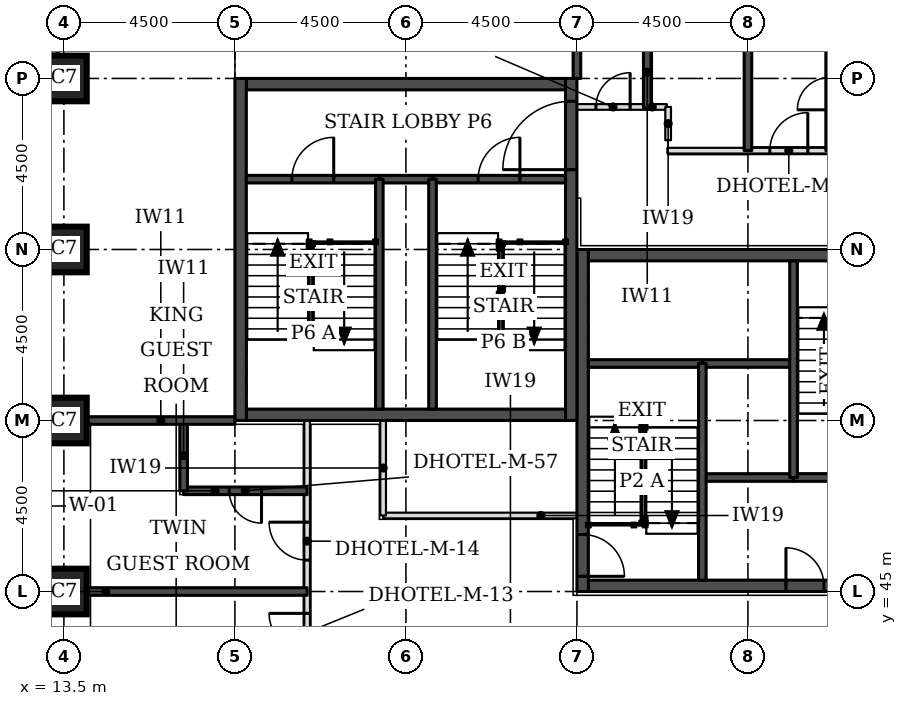
"""IFC4 building model, lengths in metres.
Left out: names, types, materials, properties, quantities, classifications, styles, units other than length and angle.
Written with IfcOpenShell. Run it as: python <this file> out.ifc"""

import sys

from ifc_helpers import new_model, si_unit, direction, frame, frame_2d, origin, origin_2d, place, context, subcontext, project, spatial, rectangle, extrude, element, fill, save


model = new_model("IFC4")
c1 = context("Model", 3, precision=1e-05, world=origin(), true_north=direction((0.0, 1.0)))
c2 = subcontext(c1, "Body", "Model", "MODEL_VIEW")
j1 = project(units=[si_unit("LENGTHUNIT", "METRE"), si_unit("PLANEANGLEUNIT", "RADIAN")], contexts=[c1])
p1 = place(None, origin())
s1 = spatial("IfcSite", under=j1, at=p1, CompositionType="ELEMENT")
p2 = place(p1, origin())
s2 = spatial("IfcBuilding", under=s1, at=p2, CompositionType="ELEMENT")
p3 = place(p2, frame((0.0, 0.0, 23.1)))
s3 = spatial("IfcBuildingStorey", under=s2, at=p3, CompositionType="ELEMENT", Elevation=23.1)
for number, where, z_axis, x_axis in (
    (1, (13.5, 45.0, 0.0), (0.0, 0.0, 1.0), (1.0, 0.0, 0.0)),
    (2, (13.5, 49.5, 0.0), (0.0, 0.0, 1.0), (1.0, 0.0, 0.0)),
    (3, (13.5, 54.0, 0.0), (0.0, 0.0, 1.0), (1.0, 0.0, 0.0)),
    (4, (13.5, 58.5, 0.0), (0.0, 0.0, 1.0), (1.0, 0.0, 0.0)),
):
    element("IfcColumn", number, at=place(p3, frame(where, z_axis=z_axis, x_axis=x_axis)), inside=s3, PredefinedType="COLUMN", context=c2, shape_type="SweptSolid", body=[
        extrude(rectangle(XDim=1.2, YDim=1.2, at=origin_2d()), origin(), (0.0, 0.0, 1.0), 3.3),
    ])
p4 = place(p3, frame((27.3, 45.15, 0.0), z_axis=(0.0, 0.0, 1.0), x_axis=(1.0, 0.0, 0.0)))
e5 = element("IfcWall", 5, at=p4, inside=s3, PredefinedType="SHEAR", context=c2, shape_type="SweptSolid", body=[
    extrude(rectangle(XDim=8.4, YDim=0.3, at=frame_2d((4.2, 0.0))), origin(), (0.0, 0.0, 1.0), 3.3),
])
p5 = place(p4, frame((5.2, 0.0, 0.0)))
e6 = element("IfcOpeningElement", 6, at=p5, cuts=e5, PredefinedType="OPENING", context=c2, shape_type="SweptSolid", body=[
    extrude(rectangle(XDim=1.0, YDim=2.1, at=frame_2d((0.5, 1.05))), frame((0.0, 0.16, 0.0), z_axis=(0.0, -1.0, 0.0), x_axis=(1.0, 0.0, 0.0)), (0.0, 0.0, 1.0), 0.32),
])
p6 = place(p3, frame((27.3, 53.85, 0.0), z_axis=(0.0, 0.0, 1.0), x_axis=(1.0, 0.0, 0.0)))
e7 = element("IfcWall", 7, at=p6, inside=s3, PredefinedType="SHEAR", context=c2, shape_type="SweptSolid", body=[
    extrude(rectangle(XDim=8.4, YDim=0.3, at=frame_2d((4.2, 0.0))), origin(), (0.0, 0.0, 1.0), 3.3),
])
p7 = place(p6, frame((6.4, 0.0, 0.0)))
e8 = element("IfcOpeningElement", 8, at=p7, cuts=e7, PredefinedType="OPENING", context=c2, shape_type="SweptSolid", body=[
    extrude(rectangle(XDim=1.1, YDim=2.1, at=frame_2d((0.55, 1.05))), frame((0.0, 0.16, 0.0), z_axis=(0.0, -1.0, 0.0), x_axis=(1.0, 0.0, 0.0)), (0.0, 0.0, 1.0), 0.32),
])
p8 = place(p3, frame((27.15, 45.0, 0.0), z_axis=(0.0, 0.0, 1.0), x_axis=(0.0, 1.0, 0.0)))
e9 = element("IfcWall", 9, at=p8, inside=s3, PredefinedType="SHEAR", context=c2, shape_type="SweptSolid", body=[
    extrude(rectangle(XDim=9.0, YDim=0.3, at=frame_2d((4.5, 0.0))), origin(), (0.0, 0.0, 1.0), 3.3),
])
p9 = place(p8, frame((0.4, 0.0, 0.0)))
e10 = element("IfcOpeningElement", 10, at=p9, cuts=e9, PredefinedType="OPENING", context=c2, shape_type="SweptSolid", body=[
    extrude(rectangle(XDim=1.1, YDim=2.1, at=frame_2d((0.55, 1.05))), frame((0.0, 0.16, 0.0), z_axis=(0.0, -1.0, 0.0), x_axis=(1.0, 0.0, 0.0)), (0.0, 0.0, 1.0), 0.32),
])
for number, where, z_axis, x_axis in (
    (11, (18.3, 49.65, 0.0), (0.0, 0.0, 1.0), (1.0, 0.0, 0.0)),
    (12, (18.3, 58.35, 0.0), (0.0, 0.0, 1.0), (1.0, 0.0, 0.0)),
):
    element("IfcWall", number, at=place(p3, frame(where, z_axis=z_axis, x_axis=x_axis)), inside=s3, PredefinedType="SHEAR", context=c2, shape_type="SweptSolid", body=[
        extrude(rectangle(XDim=8.4, YDim=0.3, at=frame_2d((4.2, 0.0))), origin(), (0.0, 0.0, 1.0), 3.3),
    ])
p10 = place(p3, frame((18.15, 49.5, 0.0), z_axis=(0.0, 0.0, 1.0), x_axis=(0.0, 1.0, 0.0)))
e13 = element("IfcWall", 13, at=p10, inside=s3, PredefinedType="SHEAR", context=c2, shape_type="SweptSolid", body=[
    extrude(rectangle(XDim=9.0, YDim=0.3, at=frame_2d((4.5, 0.0))), origin(), (0.0, 0.0, 1.0), 3.3),
])
p11 = place(p3, frame((26.85, 49.5, 0.0), z_axis=(0.0, 0.0, 1.0), x_axis=(0.0, 1.0, 0.0)))
e14 = element("IfcWall", 14, at=p11, inside=s3, PredefinedType="SHEAR", context=c2, shape_type="SweptSolid", body=[
    extrude(rectangle(XDim=9.0, YDim=0.3, at=frame_2d((4.5, 0.0))), origin(), (0.0, 0.0, 1.0), 3.3),
])
p12 = place(p11, frame((6.6, 0.0, 0.0)))
e15 = element("IfcOpeningElement", 15, at=p12, cuts=e14, PredefinedType="OPENING", context=c2, shape_type="SweptSolid", body=[
    extrude(rectangle(XDim=1.8, YDim=2.1, at=frame_2d((0.9, 1.05))), frame((0.0, 0.16, 0.0), z_axis=(0.0, -1.0, 0.0), x_axis=(1.0, 0.0, 0.0)), (0.0, 0.0, 1.0), 0.32),
])
p13 = place(p3, frame((17.73, 63.826, 0.0), z_axis=(0.0, 0.0, 1.0), x_axis=(-0.707106781187, -0.707106781187, 0.0)))
e16 = element("IfcWall", 16, at=p13, inside=s3, PredefinedType="STANDARD", context=c2, shape_type="SweptSolid", body=[
    extrude(rectangle(XDim=7.151, YDim=0.35, at=frame_2d((3.576, 0.0))), origin(), (0.0, 0.0, 1.0), 3.055),
])
p14 = place(p13, frame((1.926, 0.0, 0.8)))
e17 = element("IfcOpeningElement", 17, at=p14, cuts=e16, PredefinedType="OPENING", context=c2, shape_type="SweptSolid", body=[
    extrude(rectangle(XDim=3.3, YDim=1.5, at=frame_2d((1.65, 0.75))), frame((0.0, 0.185, 0.0), z_axis=(0.0, -1.0, 0.0), x_axis=(1.0, 0.0, 0.0)), (0.0, 0.0, 1.0), 0.37),
])
p15 = place(p3, frame((19.9, 24.4, 0.0), z_axis=(0.0, 0.0, 1.0), x_axis=(0.0, 1.0, 0.0)))
e18 = element("IfcWall", 18, at=p15, inside=s3, PredefinedType="PARTITIONING", context=c2, shape_type="SweptSolid", body=[
    extrude(rectangle(XDim=25.1, YDim=0.15, at=frame_2d((12.55, 0.0))), origin(), (0.0, 0.0, 1.0), 3.08),
])
p16 = place(p15, frame((0.447, 0.0, 0.0)))
e19 = element("IfcOpeningElement", 19, at=p16, cuts=e18, PredefinedType="OPENING", context=c2, shape_type="SweptSolid", body=[
    extrude(rectangle(XDim=0.9, YDim=2.1, at=frame_2d((0.45, 1.05))), frame((0.0, 0.085, 0.0), z_axis=(0.0, -1.0, 0.0), x_axis=(1.0, 0.0, 0.0)), (0.0, 0.0, 1.0), 0.17),
])
p17 = place(p15, frame((4.4, 0.0, 0.0)))
e20 = element("IfcOpeningElement", 20, at=p17, cuts=e18, PredefinedType="OPENING", context=c2, shape_type="SweptSolid", body=[
    extrude(rectangle(XDim=0.9, YDim=2.1, at=frame_2d((0.45, 1.05))), frame((0.0, 0.085, 0.0), z_axis=(0.0, -1.0, 0.0), x_axis=(1.0, 0.0, 0.0)), (0.0, 0.0, 1.0), 0.17),
])
p18 = place(p15, frame((10.025, 0.0, 0.0)))
e21 = element("IfcOpeningElement", 21, at=p18, cuts=e18, PredefinedType="OPENING", context=c2, shape_type="SweptSolid", body=[
    extrude(rectangle(XDim=1.0, YDim=2.1, at=frame_2d((0.5, 1.05))), frame((0.0, 0.085, 0.0), z_axis=(0.0, -1.0, 0.0), x_axis=(1.0, 0.0, 0.0)), (0.0, 0.0, 1.0), 0.17),
])
p19 = place(p15, frame((12.425, 0.0, 0.0)))
e22 = element("IfcOpeningElement", 22, at=p19, cuts=e18, PredefinedType="OPENING", context=c2, shape_type="SweptSolid", body=[
    extrude(rectangle(XDim=1.0, YDim=2.1, at=frame_2d((0.5, 1.05))), frame((0.0, 0.085, 0.0), z_axis=(0.0, -1.0, 0.0), x_axis=(1.0, 0.0, 0.0)), (0.0, 0.0, 1.0), 0.17),
])
p20 = place(p15, frame((19.025, 0.0, 0.0)))
e23 = element("IfcOpeningElement", 23, at=p20, cuts=e18, PredefinedType="OPENING", context=c2, shape_type="SweptSolid", body=[
    extrude(rectangle(XDim=1.0, YDim=2.1, at=frame_2d((0.5, 1.05))), frame((0.0, 0.085, 0.0), z_axis=(0.0, -1.0, 0.0), x_axis=(1.0, 0.0, 0.0)), (0.0, 0.0, 1.0), 0.17),
])
p21 = place(p15, frame((21.425, 0.0, 0.0)))
e24 = element("IfcOpeningElement", 24, at=p21, cuts=e18, PredefinedType="OPENING", context=c2, shape_type="SweptSolid", body=[
    extrude(rectangle(XDim=1.0, YDim=2.1, at=frame_2d((0.5, 1.05))), frame((0.0, 0.085, 0.0), z_axis=(0.0, -1.0, 0.0), x_axis=(1.0, 0.0, 0.0)), (0.0, 0.0, 1.0), 0.17),
])
p22 = place(p3, frame((21.9, 47.0, 0.0), z_axis=(0.0, 0.0, 1.0), x_axis=(1.0, 0.0, 0.0)))
e25 = element("IfcWall", 25, at=p22, inside=s3, PredefinedType="PARTITIONING", context=c2, shape_type="SweptSolid", body=[
    extrude(rectangle(XDim=5.1, YDim=0.15, at=frame_2d((2.55, 0.0))), origin(), (0.0, 0.0, 1.0), 3.08),
])
p23 = place(p3, frame((21.9, 47.0, 0.0), z_axis=(0.0, 0.0, 1.0), x_axis=(0.0, 1.0, 0.0)))
e26 = element("IfcWall", 26, at=p23, inside=s3, PredefinedType="PARTITIONING", context=c2, shape_type="SweptSolid", body=[
    extrude(rectangle(XDim=2.5, YDim=0.15, at=frame_2d((1.25, 0.0))), origin(), (0.0, 0.0, 1.0), 3.08),
])
p24 = place(p3, frame((29.38, 56.6, 0.0), z_axis=(0.0, 0.0, 1.0), x_axis=(1.0, 0.0, 0.0)))
e27 = element("IfcWall", 27, at=p24, inside=s3, PredefinedType="PARTITIONING", context=c2, shape_type="SweptSolid", body=[
    extrude(rectangle(XDim=13.62, YDim=0.15, at=frame_2d((6.81, 0.0))), origin(), (0.0, 0.0, 1.0), 3.08),
])
p25 = place(p24, frame((2.695, 0.0, 0.0)))
e28 = element("IfcOpeningElement", 28, at=p25, cuts=e27, PredefinedType="OPENING", context=c2, shape_type="SweptSolid", body=[
    extrude(rectangle(XDim=1.0, YDim=2.1, at=frame_2d((0.5, 1.05))), frame((0.0, 0.085, 0.0), z_axis=(0.0, -1.0, 0.0), x_axis=(1.0, 0.0, 0.0)), (0.0, 0.0, 1.0), 0.17),
])
p26 = place(p24, frame((9.67, 0.0, 0.0)))
e29 = element("IfcOpeningElement", 29, at=p26, cuts=e27, PredefinedType="OPENING", context=c2, shape_type="SweptSolid", body=[
    extrude(rectangle(XDim=0.9, YDim=2.1, at=frame_2d((0.45, 1.05))), frame((0.0, 0.085, 0.0), z_axis=(0.0, -1.0, 0.0), x_axis=(1.0, 0.0, 0.0)), (0.0, 0.0, 1.0), 0.17),
])
p27 = place(p3, frame((14.1, 45.0, 0.0), z_axis=(0.0, 0.0, 1.0), x_axis=(1.0, 0.0, 0.0)))
e30 = element("IfcWall", 30, at=p27, inside=s3, PredefinedType="SOLIDWALL", context=c2, shape_type="SweptSolid", body=[
    extrude(rectangle(XDim=5.8, YDim=0.2, at=frame_2d((2.9, 0.0))), origin(), (0.0, 0.0, 1.0), 3.08),
])
p28 = place(p3, frame((16.65, 47.65, 0.0), z_axis=(0.0, 0.0, 1.0), x_axis=(1.0, 0.0, 0.0)))
e31 = element("IfcWall", 31, at=p28, inside=s3, PredefinedType="SOLIDWALL", context=c2, shape_type="SweptSolid", body=[
    extrude(rectangle(XDim=3.25, YDim=0.2, at=frame_2d((1.625, 0.0))), origin(), (0.0, 0.0, 1.0), 3.08),
])
p29 = place(p28, frame((1.2, 0.0, 0.0)))
e32 = element("IfcOpeningElement", 32, at=p29, cuts=e31, PredefinedType="OPENING", context=c2, shape_type="SweptSolid", body=[
    extrude(rectangle(XDim=0.85, YDim=2.1, at=frame_2d((0.425, 1.05))), frame((0.0, 0.11, 0.0), z_axis=(0.0, -1.0, 0.0), x_axis=(1.0, 0.0, 0.0)), (0.0, 0.0, 1.0), 0.22),
])
p30 = place(p3, frame((16.65, 47.65, 0.0), z_axis=(0.0, 0.0, 1.0), x_axis=(0.0, 1.0, 0.0)))
e33 = element("IfcWall", 33, at=p30, inside=s3, PredefinedType="SOLIDWALL", context=c2, shape_type="SweptSolid", body=[
    extrude(rectangle(XDim=1.85, YDim=0.2, at=frame_2d((0.925, 0.0))), origin(), (0.0, 0.0, 1.0), 3.08),
])
for number, where, z_axis, x_axis in (
    (34, (14.1, 49.5, 0.0), (0.0, 0.0, 1.0), (1.0, 0.0, 0.0)),
    (35, (27.0, 58.5, 0.0), (0.0, 0.0, 1.0), (0.0, 1.0, 0.0)),
):
    element("IfcWall", number, at=place(p3, frame(where, z_axis=z_axis, x_axis=x_axis)), inside=s3, PredefinedType="SOLIDWALL", context=c2, shape_type="SweptSolid", body=[
        extrude(rectangle(XDim=3.9, YDim=0.2, at=frame_2d((1.95, 0.0))), origin(), (0.0, 0.0, 1.0), 3.08),
    ])
p31 = place(p3, frame((28.85, 57.73, 0.0), z_axis=(0.0, 0.0, 1.0), x_axis=(0.0, 1.0, 0.0)))
e36 = element("IfcWall", 36, at=p31, inside=s3, PredefinedType="SOLIDWALL", context=c2, shape_type="SweptSolid", body=[
    extrude(rectangle(XDim=1.87, YDim=0.2, at=frame_2d((0.935, 0.0))), origin(), (0.0, 0.0, 1.0), 3.08),
])
p32 = place(p3, frame((31.5, 56.6, 0.0), z_axis=(0.0, 0.0, 1.0), x_axis=(0.0, 1.0, 0.0)))
e37 = element("IfcWall", 37, at=p32, inside=s3, PredefinedType="SOLIDWALL", context=c2, shape_type="SweptSolid", body=[
    extrude(rectangle(XDim=5.8, YDim=0.2, at=frame_2d((2.9, 0.0))), origin(), (0.0, 0.0, 1.0), 3.08),
])
p33 = place(p3, frame((33.65, 56.6, 0.0), z_axis=(0.0, 0.0, 1.0), x_axis=(0.0, 1.0, 0.0)))
e38 = element("IfcWall", 38, at=p33, inside=s3, PredefinedType="SOLIDWALL", context=c2, shape_type="SweptSolid", body=[
    extrude(rectangle(XDim=3.0, YDim=0.2, at=frame_2d((1.5, 0.0))), origin(), (0.0, 0.0, 1.0), 3.08),
])
p34 = place(p33, frame((1.075, 0.0, 0.0)))
e39 = element("IfcOpeningElement", 39, at=p34, cuts=e38, PredefinedType="OPENING", context=c2, shape_type="SweptSolid", body=[
    extrude(rectangle(XDim=0.85, YDim=2.1, at=frame_2d((0.425, 1.05))), frame((0.0, 0.11, 0.0), z_axis=(0.0, -1.0, 0.0), x_axis=(1.0, 0.0, 0.0)), (0.0, 0.0, 1.0), 0.22),
])
p35 = place(p3, frame((27.0, 57.75, 0.0), z_axis=(0.0, 0.0, 1.0), x_axis=(1.0, 0.0, 0.0)))
e40 = element("IfcWall", 40, at=p35, inside=s3, PredefinedType="PARTITIONING", context=c2, shape_type="SweptSolid", body=[
    extrude(rectangle(XDim=2.365, YDim=0.15, at=frame_2d((1.183, 0.0))), origin(), (0.0, 0.0, 1.0), 3.08),
])
p36 = place(p35, frame((0.5, 0.0, 0.0)))
e41 = element("IfcOpeningElement", 41, at=p36, cuts=e40, PredefinedType="OPENING", context=c2, shape_type="SweptSolid", body=[
    extrude(rectangle(XDim=0.9, YDim=2.1, at=frame_2d((0.45, 1.05))), frame((0.0, 0.085, 0.0), z_axis=(0.0, -1.0, 0.0), x_axis=(1.0, 0.0, 0.0)), (0.0, 0.0, 1.0), 0.17),
])
p37 = place(p3, frame((29.4, 57.75, 0.0), z_axis=(0.0, 0.0, 1.0), x_axis=(0.0, -1.0, 0.0)))
e42 = element("IfcWall", 42, at=p37, inside=s3, PredefinedType="PARTITIONING", context=c2, shape_type="SweptSolid", body=[
    extrude(rectangle(XDim=0.875, YDim=0.15, at=frame_2d((0.438, 0.0))), origin(), (0.0, 0.0, 1.0), 3.08),
])
p38 = place(p3, frame((30.3, 48.0, 0.0), z_axis=(0.0, 0.0, 1.0), x_axis=(1.0, 0.0, 0.0)))
e43 = element("IfcWall", 43, at=p38, inside=s3, PredefinedType="SOLIDWALL", context=c2, shape_type="SweptSolid", body=[
    extrude(rectangle(XDim=2.4, YDim=0.2, at=frame_2d((1.2, 0.0))), origin(), (0.0, 0.0, 1.0), 3.08),
])
p39 = place(p3, frame((32.7, 48.0, 0.0), z_axis=(0.0, 0.0, 1.0), x_axis=(1.0, 0.0, 0.0)))
e44 = element("IfcWall", 44, at=p39, inside=s3, PredefinedType="SOLIDWALL", context=c2, shape_type="SweptSolid", body=[
    extrude(rectangle(XDim=3.0, YDim=0.2, at=frame_2d((1.5, 0.0))), origin(), (0.0, 0.0, 1.0), 3.08),
])
p40 = place(p3, frame((30.3, 51.0, 0.0), z_axis=(0.0, 0.0, 1.0), x_axis=(1.0, 0.0, 0.0)))
e45 = element("IfcWall", 45, at=p40, inside=s3, PredefinedType="SOLIDWALL", context=c2, shape_type="SweptSolid", body=[
    extrude(rectangle(XDim=2.4, YDim=0.2, at=frame_2d((1.2, 0.0))), origin(), (0.0, 0.0, 1.0), 3.3),
])
p41 = place(p3, frame((27.3, 51.0, 0.0), z_axis=(0.0, 0.0, 1.0), x_axis=(1.0, 0.0, 0.0)))
e46 = element("IfcWall", 46, at=p41, inside=s3, PredefinedType="SOLIDWALL", context=c2, shape_type="SweptSolid", body=[
    extrude(rectangle(XDim=3.0, YDim=0.2, at=frame_2d((1.5, 0.0))), origin(), (0.0, 0.0, 1.0), 3.08),
])
for number, where, z_axis, x_axis in (
    (47, (30.3, 45.3, 0.0), (0.0, 0.0, 1.0), (0.0, 1.0, 0.0)),
    (48, (32.7, 48.0, 0.0), (0.0, 0.0, 1.0), (0.0, 1.0, 0.0)),
):
    element("IfcWall", number, at=place(p3, frame(where, z_axis=z_axis, x_axis=x_axis)), inside=s3, PredefinedType="SOLIDWALL", context=c2, shape_type="SweptSolid", body=[
        extrude(rectangle(XDim=5.7, YDim=0.2, at=frame_2d((2.85, 0.0))), origin(), (0.0, 0.0, 1.0), 3.08),
    ])
p42 = place(p3, frame((21.8, 55.85, 0.0), z_axis=(0.0, 0.0, 1.0), x_axis=(1.0, 0.0, 0.0)))
e49 = element("IfcWall", 49, at=p42, inside=s3, PredefinedType="SOLIDWALL", context=c2, shape_type="SweptSolid", body=[
    extrude(rectangle(XDim=1.4, YDim=0.2, at=frame_2d((0.7, 0.0))), origin(), (0.0, 0.0, 1.0), 3.08),
])
p43 = place(p3, frame((18.3, 55.85, 0.0), z_axis=(0.0, 0.0, 1.0), x_axis=(1.0, 0.0, 0.0)))
e50 = element("IfcWall", 50, at=p43, inside=s3, PredefinedType="SOLIDWALL", context=c2, shape_type="SweptSolid", body=[
    extrude(rectangle(XDim=3.5, YDim=0.2, at=frame_2d((1.75, 0.0))), origin(), (0.0, 0.0, 1.0), 3.08),
])
p44 = place(p43, frame((1.2, 0.0, 0.0)))
e51 = element("IfcOpeningElement", 51, at=p44, cuts=e50, PredefinedType="OPENING", context=c2, shape_type="SweptSolid", body=[
    extrude(rectangle(XDim=1.1, YDim=2.1, at=frame_2d((0.55, 1.05))), frame((0.0, 0.11, 0.0), z_axis=(0.0, -1.0, 0.0), x_axis=(1.0, 0.0, 0.0)), (0.0, 0.0, 1.0), 0.22),
])
p45 = place(p3, frame((23.2, 55.85, 0.0), z_axis=(0.0, 0.0, 1.0), x_axis=(1.0, 0.0, 0.0)))
e52 = element("IfcWall", 52, at=p45, inside=s3, PredefinedType="SOLIDWALL", context=c2, shape_type="SweptSolid", body=[
    extrude(rectangle(XDim=3.5, YDim=0.2, at=frame_2d((1.75, 0.0))), origin(), (0.0, 0.0, 1.0), 3.08),
])
p46 = place(p45, frame((1.2, 0.0, 0.0)))
e53 = element("IfcOpeningElement", 53, at=p46, cuts=e52, PredefinedType="OPENING", context=c2, shape_type="SweptSolid", body=[
    extrude(rectangle(XDim=1.1, YDim=2.1, at=frame_2d((0.55, 1.05))), frame((0.0, 0.11, 0.0), z_axis=(0.0, -1.0, 0.0), x_axis=(1.0, 0.0, 0.0)), (0.0, 0.0, 1.0), 0.22),
])
for number, where, z_axis, x_axis in (
    (54, (21.8, 49.8, 0.0), (0.0, 0.0, 1.0), (0.0, 1.0, 0.0)),
    (55, (23.2, 49.8, 0.0), (0.0, 0.0, 1.0), (0.0, 1.0, 0.0)),
):
    element("IfcWall", number, at=place(p3, frame(where, z_axis=z_axis, x_axis=x_axis)), inside=s3, PredefinedType="SOLIDWALL", context=c2, shape_type="SweptSolid", body=[
        extrude(rectangle(XDim=6.05, YDim=0.2, at=frame_2d((3.025, 0.0))), origin(), (0.0, 0.0, 1.0), 3.08),
    ])
p47 = place(p20, origin())
e56 = element("IfcDoor", 56, at=p47, inside=s3, OperationType="SINGLE_SWING_RIGHT", PredefinedType="DOOR", context=c2, shape_type="SweptSolid", body=[
    extrude(rectangle(XDim=1.0, YDim=2.1, at=frame_2d((0.5, 1.05))), frame((0.0, 0.025, 0.0), z_axis=(0.0, -1.0, 0.0), x_axis=(1.0, 0.0, 0.0)), (0.0, 0.0, 1.0), 0.05),
])
fill(e23, e56)
p48 = place(p21, origin())
e57 = element("IfcDoor", 57, at=p48, inside=s3, OperationType="SINGLE_SWING_RIGHT", PredefinedType="DOOR", context=c2, shape_type="SweptSolid", body=[
    extrude(rectangle(XDim=1.0, YDim=2.1, at=frame_2d((0.5, 1.05))), frame((0.0, 0.025, 0.0), z_axis=(0.0, -1.0, 0.0), x_axis=(1.0, 0.0, 0.0)), (0.0, 0.0, 1.0), 0.05),
])
fill(e24, e57)
p49 = place(p29, frame((0.85, 0.0, 0.0), z_axis=(0.0, 0.0, 1.0), x_axis=(-1.0, 0.0, 0.0)))
e58 = element("IfcDoor", 58, at=p49, inside=s3, OperationType="SINGLE_SWING_LEFT", PredefinedType="DOOR", context=c2, shape_type="SweptSolid", body=[
    extrude(rectangle(XDim=0.85, YDim=2.1, at=frame_2d((0.425, 1.05))), frame((0.0, 0.025, 0.0), z_axis=(0.0, -1.0, 0.0), x_axis=(1.0, 0.0, 0.0)), (0.0, 0.0, 1.0), 0.05),
])
fill(e32, e58)
p50 = place(p25, origin())
e59 = element("IfcDoor", 59, at=p50, inside=s3, OperationType="SINGLE_SWING_RIGHT", PredefinedType="DOOR", context=c2, shape_type="SweptSolid", body=[
    extrude(rectangle(XDim=1.0, YDim=2.1, at=frame_2d((0.5, 1.05))), frame((0.0, 0.025, 0.0), z_axis=(0.0, -1.0, 0.0), x_axis=(1.0, 0.0, 0.0)), (0.0, 0.0, 1.0), 0.05),
])
fill(e28, e59)
p51 = place(p36, origin())
e60 = element("IfcDoor", 60, at=p51, inside=s3, OperationType="SINGLE_SWING_RIGHT", PredefinedType="DOOR", context=c2, shape_type="SweptSolid", body=[
    extrude(rectangle(XDim=0.9, YDim=2.1, at=frame_2d((0.45, 1.05))), frame((0.0, 0.025, 0.0), z_axis=(0.0, -1.0, 0.0), x_axis=(1.0, 0.0, 0.0)), (0.0, 0.0, 1.0), 0.05),
])
fill(e41, e60)
p52 = place(p9, frame((1.1, 0.0, 0.0), z_axis=(0.0, 0.0, 1.0), x_axis=(-1.0, 0.0, 0.0)))
e61 = element("IfcDoor", 61, at=p52, inside=s3, OperationType="SINGLE_SWING_RIGHT", PredefinedType="DOOR", context=c2, shape_type="SweptSolid", body=[
    extrude(rectangle(XDim=1.1, YDim=2.1, at=frame_2d((0.55, 1.05))), frame((0.0, 0.025, 0.0), z_axis=(0.0, -1.0, 0.0), x_axis=(1.0, 0.0, 0.0)), (0.0, 0.0, 1.0), 0.05),
])
fill(e10, e61)
p53 = place(p5, origin())
e62 = element("IfcDoor", 62, at=p53, inside=s3, OperationType="SINGLE_SWING_LEFT", PredefinedType="DOOR", context=c2, shape_type="SweptSolid", body=[
    extrude(rectangle(XDim=1.0, YDim=2.1, at=frame_2d((0.5, 1.05))), frame((0.0, 0.025, 0.0), z_axis=(0.0, -1.0, 0.0), x_axis=(1.0, 0.0, 0.0)), (0.0, 0.0, 1.0), 0.05),
])
fill(e6, e62)
p54 = place(p44, origin())
e63 = element("IfcDoor", 63, at=p54, inside=s3, OperationType="SINGLE_SWING_RIGHT", PredefinedType="DOOR", context=c2, shape_type="SweptSolid", body=[
    extrude(rectangle(XDim=1.1, YDim=2.1, at=frame_2d((0.55, 1.05))), frame((0.0, 0.025, 0.0), z_axis=(0.0, -1.0, 0.0), x_axis=(1.0, 0.0, 0.0)), (0.0, 0.0, 1.0), 0.05),
])
fill(e51, e63)
p55 = place(p46, origin())
e64 = element("IfcDoor", 64, at=p55, inside=s3, OperationType="SINGLE_SWING_RIGHT", PredefinedType="DOOR", context=c2, shape_type="SweptSolid", body=[
    extrude(rectangle(XDim=1.1, YDim=2.1, at=frame_2d((0.55, 1.05))), frame((0.0, 0.025, 0.0), z_axis=(0.0, -1.0, 0.0), x_axis=(1.0, 0.0, 0.0)), (0.0, 0.0, 1.0), 0.05),
])
fill(e53, e64)
p56 = place(p12, origin())
e65 = element("IfcDoor", 65, at=p56, inside=s3, OperationType="SINGLE_SWING_LEFT", PredefinedType="DOOR", context=c2, shape_type="SweptSolid", body=[
    extrude(rectangle(XDim=1.8, YDim=2.1, at=frame_2d((0.9, 1.05))), frame((0.0, 0.025, 0.0), z_axis=(0.0, -1.0, 0.0), x_axis=(1.0, 0.0, 0.0)), (0.0, 0.0, 1.0), 0.05),
])
fill(e15, e65)
save(model, sys.argv[1])
